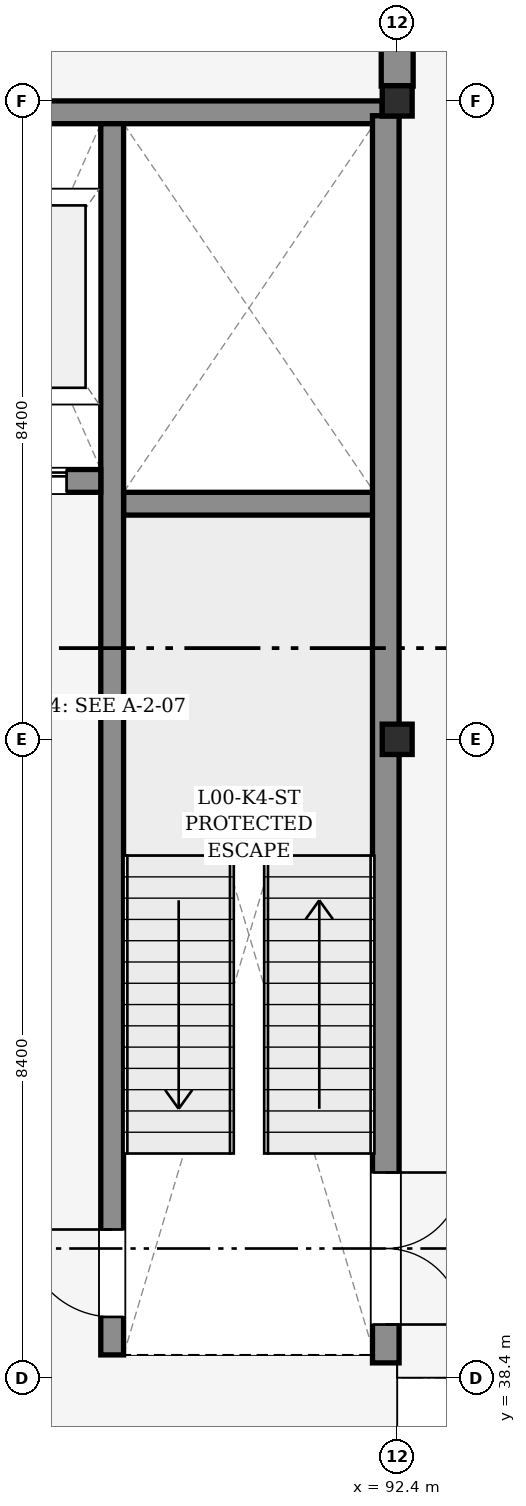
"""IFC4 building model, lengths in metres.
Left out: names, types, materials, properties, quantities, classifications, styles, units other than length and angle.
Written with IfcOpenShell. Run it as: python <this file> out.ifc"""

import sys

from ifc_helpers import new_model, si_unit, direction, frame, frame_2d, origin, origin_2d, place, context, subcontext, project, spatial, rectangle, i_section, extrude, element, fill, save


model = new_model("IFC4")
c1 = context("Model", 3, precision=1e-05, world=origin(), true_north=direction((0.0, 1.0)))
c2 = subcontext(c1, "Body", "Model", "MODEL_VIEW")
j1 = project(units=[si_unit("LENGTHUNIT", "METRE"), si_unit("PLANEANGLEUNIT", "RADIAN")], contexts=[c1])
p1 = place(None, origin())
s1 = spatial("IfcSite", under=j1, at=p1, CompositionType="ELEMENT")
p2 = place(p1, origin())
s2 = spatial("IfcBuilding", under=s1, at=p2, CompositionType="ELEMENT")
p3 = place(p2, origin())
s3 = spatial("IfcBuildingStorey", under=s2, at=p3, CompositionType="ELEMENT", Elevation=0.0)
for number, where, z_axis, x_axis in (
    (1, (92.4, 38.4, 0.0), (0.0, 0.0, 1.0), (1.0, 0.0, 0.0)),
    (2, (92.4, 46.8, 0.0), (0.0, 0.0, 1.0), (1.0, 0.0, 0.0)),
    (3, (92.4, 55.2, 0.0), (0.0, 0.0, 1.0), (1.0, 0.0, 0.0)),
):
    element("IfcColumn", number, at=place(p3, frame(where, z_axis=z_axis, x_axis=x_axis)), inside=s3, PredefinedType="COLUMN", context=c2, shape_type="SweptSolid", body=[
        extrude(i_section(OverallWidth=0.399, OverallDepth=0.394, WebThickness=0.023, FlangeThickness=0.037, FilletRadius=0.015, at=origin_2d()), origin(), (0.0, 0.0, 1.0), 5.4),
    ])
p4 = place(p3, frame((92.4, 55.395, 0.0), z_axis=(0.0, 0.0, 1.0), x_axis=(0.0, 1.0, 0.0)))
e4 = element("IfcWall", 4, at=p4, inside=s3, PredefinedType="STANDARD", context=c2, shape_type="SweptSolid", body=[
    extrude(rectangle(XDim=8.01, YDim=0.42, at=frame_2d((4.005, 0.0))), origin(), (0.0, 0.0, 1.0), 4.335),
])
p5 = place(p4, frame((2.9, 0.0, 0.0)))
e5 = element("IfcOpeningElement", 5, at=p5, cuts=e4, PredefinedType="OPENING", context=c2, shape_type="SweptSolid", body=[
    extrude(rectangle(XDim=2.2, YDim=2.6, at=frame_2d((1.1, 1.3))), frame((0.0, 0.22, 0.0), z_axis=(0.0, -1.0, 0.0), x_axis=(1.0, 0.0, 0.0)), (0.0, 0.0, 1.0), 0.44),
])
for number, where, z_axis, x_axis in (
    (6, (84.198, 38.55, 0.0), (0.0, 0.0, 1.0), (1.0, 0.0, 0.0)),
    (7, (84.198, 55.05, 0.0), (0.0, 0.0, 1.0), (1.0, 0.0, 0.0)),
):
    element("IfcWall", number, at=place(p3, frame(where, z_axis=z_axis, x_axis=x_axis)), inside=s3, PredefinedType="SHEAR", context=c2, shape_type="SweptSolid", body=[
        extrude(rectangle(XDim=8.005, YDim=0.3, at=frame_2d((4.002, 0.0))), origin(), (0.0, 0.0, 1.0), 5.18),
    ])
p6 = place(p3, frame((88.8, 49.9, 0.0), z_axis=(0.0, 0.0, 1.0), x_axis=(1.0, 0.0, 0.0)))
e8 = element("IfcWall", 8, at=p6, inside=s3, PredefinedType="SHEAR", context=c2, shape_type="SweptSolid", body=[
    extrude(rectangle(XDim=3.3, YDim=0.3, at=frame_2d((1.65, 0.0))), origin(), (0.0, 0.0, 1.0), 5.18),
])
p7 = place(p3, frame((92.25, 38.595, 0.0), z_axis=(0.0, 0.0, 1.0), x_axis=(0.0, 1.0, 0.0)))
e9 = element("IfcWall", 9, at=p7, inside=s3, PredefinedType="SHEAR", context=c2, shape_type="SweptSolid", body=[
    extrude(rectangle(XDim=16.41, YDim=0.35, at=frame_2d((8.205, 0.0))), origin(), (0.0, 0.0, 1.0), 5.18),
])
p8 = place(p7, frame((0.505, 0.0, 0.0)))
e10 = element("IfcOpeningElement", 10, at=p8, cuts=e9, PredefinedType="OPENING", context=c2, shape_type="SweptSolid", body=[
    extrude(rectangle(XDim=2.0, YDim=2.32, at=frame_2d((1.0, 1.16))), frame((0.0, 0.185, 0.0), z_axis=(0.0, -1.0, 0.0), x_axis=(1.0, 0.0, 0.0)), (0.0, 0.0, 1.0), 0.37),
])
p9 = place(p3, frame((88.65, 38.7, 0.0), z_axis=(0.0, 0.0, 1.0), x_axis=(0.0, 1.0, 0.0)))
e11 = element("IfcWall", 11, at=p9, inside=s3, PredefinedType="SHEAR", context=c2, shape_type="SweptSolid", body=[
    extrude(rectangle(XDim=16.2, YDim=0.3, at=frame_2d((8.1, 0.0))), origin(), (0.0, 0.0, 1.0), 5.18),
])
p10 = place(p9, frame((0.5, 0.0, 0.0)))
e12 = element("IfcOpeningElement", 12, at=p10, cuts=e11, PredefinedType="OPENING", context=c2, shape_type="SweptSolid", body=[
    extrude(rectangle(XDim=1.15, YDim=2.15, at=frame_2d((0.575, 1.075))), frame((0.0, 0.16, 0.0), z_axis=(0.0, -1.0, 0.0), x_axis=(1.0, 0.0, 0.0)), (0.0, 0.0, 1.0), 0.32),
])
p11 = place(p3, frame((86.3, 50.2, 0.0), z_axis=(0.0, 0.0, 1.0), x_axis=(1.0, 0.0, 0.0)))
e13 = element("IfcWall", 13, at=p11, inside=s3, PredefinedType="SHEAR", context=c2, shape_type="SweptSolid", body=[
    extrude(rectangle(XDim=2.2, YDim=0.3, at=frame_2d((1.1, 0.0))), origin(), (0.0, 0.0, 1.0), 5.18),
])
p12 = place(p11, frame((0.65, 0.0, 0.0)))
e14 = element("IfcOpeningElement", 14, at=p12, cuts=e13, PredefinedType="OPENING", context=c2, shape_type="SweptSolid", body=[
    extrude(rectangle(XDim=1.1, YDim=2.2, at=frame_2d((0.55, 1.1))), frame((0.0, 0.16, 0.0), z_axis=(0.0, -1.0, 0.0), x_axis=(1.0, 0.0, 0.0)), (0.0, 0.0, 1.0), 0.32),
])
p13 = place(p8, frame((2.0, 0.0, 0.0), z_axis=(0.0, 0.0, 1.0), x_axis=(-1.0, 0.0, 0.0)))
e15 = element("IfcDoor", 15, at=p13, inside=s3, OperationType="DOUBLE_DOOR_SINGLE_SWING", PredefinedType="DOOR", context=c2, shape_type="SweptSolid", body=[
    extrude(rectangle(XDim=2.0, YDim=2.32, at=frame_2d((1.0, 1.16))), frame((0.0, 0.025, 0.0), z_axis=(0.0, -1.0, 0.0), x_axis=(1.0, 0.0, 0.0)), (0.0, 0.0, 1.0), 0.05),
])
fill(e10, e15)
p14 = place(p10, origin())
e16 = element("IfcDoor", 16, at=p14, inside=s3, OperationType="SINGLE_SWING_RIGHT", PredefinedType="DOOR", context=c2, shape_type="SweptSolid", body=[
    extrude(rectangle(XDim=1.15, YDim=2.15, at=frame_2d((0.575, 1.075))), frame((0.0, 0.025, 0.0), z_axis=(0.0, -1.0, 0.0), x_axis=(1.0, 0.0, 0.0)), (0.0, 0.0, 1.0), 0.05),
])
fill(e12, e16)
p15 = place(p12, origin())
e17 = element("IfcDoor", 17, at=p15, inside=s3, OperationType="SLIDING_TO_LEFT", PredefinedType="DOOR", context=c2, shape_type="SweptSolid", body=[
    extrude(rectangle(XDim=1.1, YDim=2.2, at=frame_2d((0.55, 1.1))), frame((0.0, 0.025, 0.0), z_axis=(0.0, -1.0, 0.0), x_axis=(1.0, 0.0, 0.0)), (0.0, 0.0, 1.0), 0.05),
])
fill(e14, e17)
save(model, sys.argv[1])
